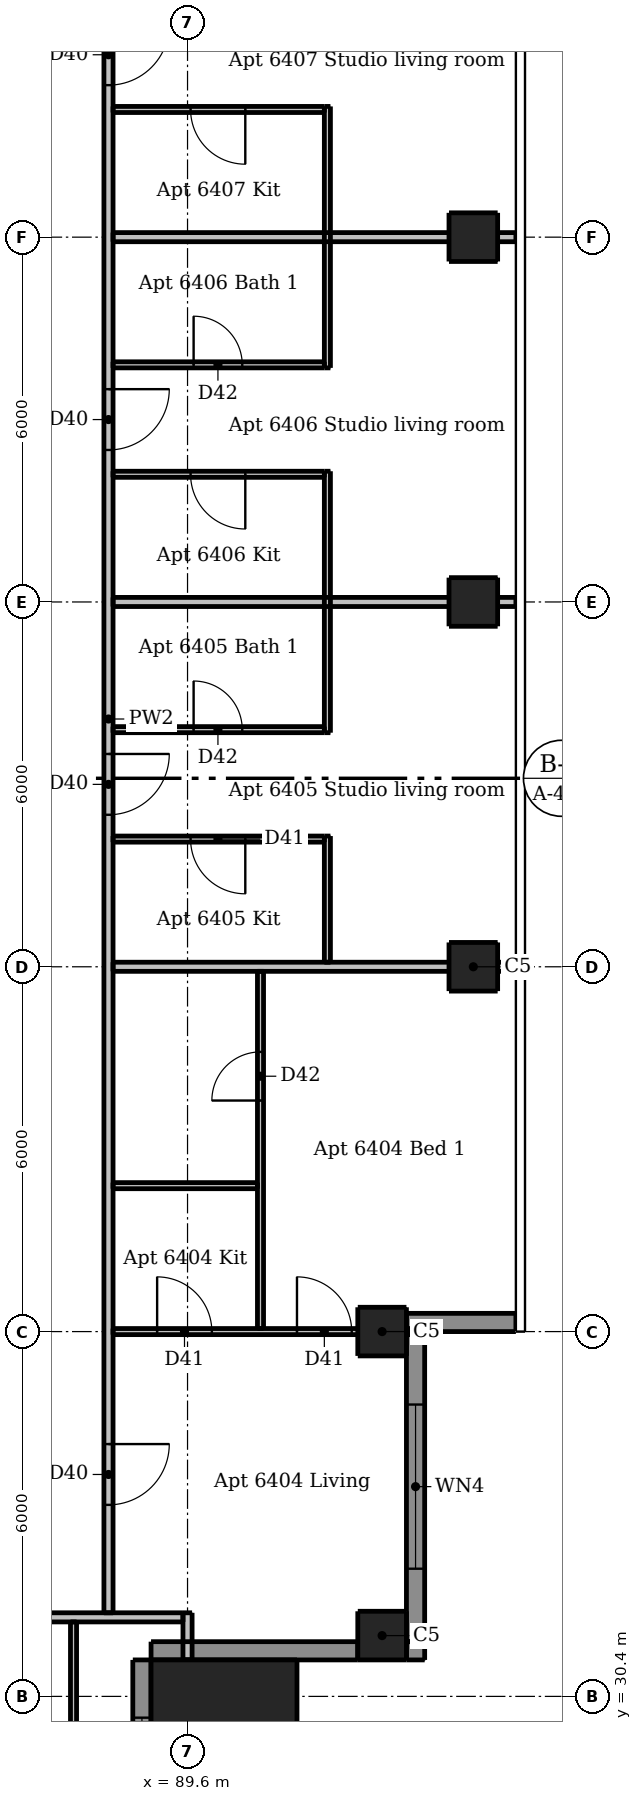
"""IFC4 building model, lengths in metres.
Left out: names, types, materials, properties, quantities, classifications, styles, units other than length and angle.
Written with IfcOpenShell. Run it as: python <this file> out.ifc"""

import sys

from ifc_helpers import new_model, si_unit, direction, frame, frame_2d, origin, origin_2d, place, context, subcontext, project, spatial, rectangle, extrude, element, fill, save


model = new_model("IFC4")
c1 = context("Model", 3, precision=1e-05, world=origin(), true_north=direction((0.0, 1.0)))
c2 = subcontext(c1, "Body", "Model", "MODEL_VIEW")
j1 = project(units=[si_unit("LENGTHUNIT", "METRE"), si_unit("PLANEANGLEUNIT", "RADIAN")], contexts=[c1])
p1 = place(None, origin())
s1 = spatial("IfcSite", under=j1, at=p1, CompositionType="ELEMENT")
p2 = place(p1, origin())
s2 = spatial("IfcBuilding", under=s1, at=p2, CompositionType="ELEMENT")
p3 = place(p2, frame((0.0, 0.0, 242.2)))
s3 = spatial("IfcBuildingStorey", under=s2, at=p3, CompositionType="ELEMENT", Elevation=242.2)
for number, where, z_axis, x_axis in (
    (1, (92.8, 31.4, 0.0), (0.0, 0.0, 1.0), (1.0, 0.0, 0.0)),
    (2, (92.8, 36.4, 0.0), (0.0, 0.0, 1.0), (1.0, 0.0, 0.0)),
    (3, (94.3, 42.4, 0.0), (0.0, 0.0, 1.0), (1.0, 0.0, 0.0)),
    (4, (94.3, 48.4, 0.0), (0.0, 0.0, 1.0), (1.0, 0.0, 0.0)),
    (5, (94.3, 54.4, 0.0), (0.0, 0.0, 1.0), (1.0, 0.0, 0.0)),
):
    element("IfcColumn", number, at=place(p3, frame(where, z_axis=z_axis, x_axis=x_axis)), inside=s3, PredefinedType="COLUMN", context=c2, shape_type="SweptSolid", body=[
        extrude(rectangle(XDim=0.8, YDim=0.8, at=origin_2d()), origin(), (0.0, 0.0, 1.0), 3.05),
    ])
p4 = place(p3, frame((90.2, 29.8, 0.0), z_axis=(0.0, 0.0, 1.0), x_axis=(1.0, 0.0, 0.0)))
e6 = element("IfcColumn", 6, at=p4, inside=s3, PredefinedType="COLUMN", context=c2, shape_type="SweptSolid", body=[
    extrude(rectangle(XDim=2.4, YDim=2.4, at=origin_2d()), origin(), (0.0, 0.0, 1.0), 3.3),
])
p5 = place(p3, frame((88.85, 27.6, 0.0), z_axis=(0.0, 0.0, 1.0), x_axis=(0.0, 1.0, 0.0)))
e7 = element("IfcWall", 7, at=p5, inside=s3, PredefinedType="SOLIDWALL", context=c2, shape_type="SweptSolid", body=[
    extrude(rectangle(XDim=3.4, YDim=0.3, at=frame_2d((1.7, 0.0))), origin(), (0.0, 0.0, 1.0), 3.05),
])
p6 = place(p5, frame((0.95, 0.0, 0.9)))
e8 = element("IfcOpeningElement", 8, at=p6, cuts=e7, PredefinedType="OPENING", context=c2, shape_type="SweptSolid", body=[
    extrude(rectangle(XDim=1.5, YDim=1.5, at=frame_2d((0.75, 0.75))), frame((0.0, 0.16, 0.0), z_axis=(0.0, -1.0, 0.0), x_axis=(1.0, 0.0, 0.0)), (0.0, 0.0, 1.0), 0.32),
])
p7 = place(p3, frame((89.0, 31.15, 0.0), z_axis=(0.0, 0.0, 1.0), x_axis=(1.0, 0.0, 0.0)))
e9 = element("IfcWall", 9, at=p7, inside=s3, PredefinedType="SOLIDWALL", context=c2, shape_type="SweptSolid", body=[
    extrude(rectangle(XDim=3.4, YDim=0.3, at=frame_2d((1.7, 0.0))), origin(), (0.0, 0.0, 1.0), 3.05),
])
p8 = place(p3, frame((93.2, 31.15, 0.0), z_axis=(0.0, 0.0, 1.0), x_axis=(1.0, 0.0, 0.0)))
e10 = element("IfcWall", 10, at=p8, inside=s3, PredefinedType="SOLIDWALL", context=c2, shape_type="SweptSolid", body=[
    extrude(rectangle(XDim=0.3, YDim=0.3, at=frame_2d((0.15, 0.0))), origin(), (0.0, 0.0, 1.0), 3.05),
])
p9 = place(p3, frame((93.2, 36.55, 0.0), z_axis=(0.0, 0.0, 1.0), x_axis=(1.0, 0.0, 0.0)))
e11 = element("IfcWall", 11, at=p9, inside=s3, PredefinedType="SOLIDWALL", context=c2, shape_type="SweptSolid", body=[
    extrude(rectangle(XDim=1.8, YDim=0.3, at=frame_2d((0.9, 0.0))), origin(), (0.0, 0.0, 1.0), 3.05),
])
p10 = place(p3, frame((93.35, 31.3, 0.0), z_axis=(0.0, 0.0, 1.0), x_axis=(0.0, 1.0, 0.0)))
e12 = element("IfcWall", 12, at=p10, inside=s3, PredefinedType="SOLIDWALL", context=c2, shape_type="SweptSolid", body=[
    extrude(rectangle(XDim=5.1, YDim=0.3, at=frame_2d((2.55, 0.0))), origin(), (0.0, 0.0, 1.0), 3.05),
])
p11 = place(p10, frame((1.2, 0.0, 0.15)))
e13 = element("IfcOpeningElement", 13, at=p11, cuts=e12, PredefinedType="OPENING", context=c2, shape_type="SweptSolid", body=[
    extrude(rectangle(XDim=2.7, YDim=2.1, at=frame_2d((1.35, 1.05))), frame((0.0, 0.16, 0.0), z_axis=(0.0, -1.0, 0.0), x_axis=(1.0, 0.0, 0.0)), (0.0, 0.0, 1.0), 0.32),
])
p12 = place(p3, frame((87.725, 29.05, 0.0), z_axis=(0.0, 0.0, 1.0), x_axis=(0.0, 1.0, 0.0)))
e14 = element("IfcWall", 14, at=p12, inside=s3, PredefinedType="PARTITIONING", context=c2, shape_type="SweptSolid", body=[
    extrude(rectangle(XDim=2.575, YDim=0.1, at=frame_2d((1.288, 0.0))), origin(), (0.0, 0.0, 1.0), 3.05),
])
p13 = place(p3, frame((90.8, 36.45, 0.0), z_axis=(0.0, 0.0, 1.0), x_axis=(0.0, 1.0, 0.0)))
e15 = element("IfcWall", 15, at=p13, inside=s3, PredefinedType="PARTITIONING", context=c2, shape_type="SweptSolid", body=[
    extrude(rectangle(XDim=5.875, YDim=0.1, at=frame_2d((2.938, 0.0))), origin(), (0.0, 0.0, 1.0), 3.05),
])
p14 = place(p13, frame((3.75, 0.0, 0.0)))
e16 = element("IfcOpeningElement", 16, at=p14, cuts=e15, PredefinedType="OPENING", context=c2, shape_type="SweptSolid", body=[
    extrude(rectangle(XDim=0.8, YDim=2.1, at=frame_2d((0.4, 1.05))), frame((0.0, 0.06, 0.0), z_axis=(0.0, -1.0, 0.0), x_axis=(1.0, 0.0, 0.0)), (0.0, 0.0, 1.0), 0.12),
])
p15 = place(p3, frame((91.9, 42.475, 0.0), z_axis=(0.0, 0.0, 1.0), x_axis=(0.0, 1.0, 0.0)))
e17 = element("IfcWall", 17, at=p15, inside=s3, PredefinedType="PARTITIONING", context=c2, shape_type="SweptSolid", body=[
    extrude(rectangle(XDim=2.075, YDim=0.1, at=frame_2d((1.038, 0.0))), origin(), (0.0, 0.0, 1.0), 3.05),
])
for number, where, z_axis, x_axis in (
    (18, (91.9, 46.25, 0.0), (0.0, 0.0, 1.0), (0.0, 1.0, 0.0)),
    (19, (91.9, 52.25, 0.0), (0.0, 0.0, 1.0), (0.0, 1.0, 0.0)),
):
    element("IfcWall", number, at=place(p3, frame(where, z_axis=z_axis, x_axis=x_axis)), inside=s3, PredefinedType="PARTITIONING", context=c2, shape_type="SweptSolid", body=[
        extrude(rectangle(XDim=4.3, YDim=0.1, at=frame_2d((2.15, 0.0))), origin(), (0.0, 0.0, 1.0), 3.05),
    ])
p16 = place(p3, frame((91.85, 56.5, 0.0), z_axis=(0.0, 0.0, 1.0), x_axis=(-1.0, 0.0, 0.0)))
e20 = element("IfcWall", 20, at=p16, inside=s3, PredefinedType="PARTITIONING", context=c2, shape_type="SweptSolid", body=[
    extrude(rectangle(XDim=3.475, YDim=0.1, at=frame_2d((1.738, 0.0))), origin(), (0.0, 0.0, 1.0), 3.05),
])
p17 = place(p16, frame((1.3, 0.0, 0.0)))
e21 = element("IfcOpeningElement", 21, at=p17, cuts=e20, PredefinedType="OPENING", context=c2, shape_type="SweptSolid", body=[
    extrude(rectangle(XDim=0.9, YDim=2.1, at=frame_2d((0.45, 1.05))), frame((0.0, 0.06, 0.0), z_axis=(0.0, -1.0, 0.0), x_axis=(1.0, 0.0, 0.0)), (0.0, 0.0, 1.0), 0.12),
])
p18 = place(p3, frame((88.375, 52.3, 0.0), z_axis=(0.0, 0.0, 1.0), x_axis=(1.0, 0.0, 0.0)))
e22 = element("IfcWall", 22, at=p18, inside=s3, PredefinedType="PARTITIONING", context=c2, shape_type="SweptSolid", body=[
    extrude(rectangle(XDim=3.475, YDim=0.1, at=frame_2d((1.738, 0.0))), origin(), (0.0, 0.0, 1.0), 3.05),
])
p19 = place(p18, frame((1.325, 0.0, 0.0)))
e23 = element("IfcOpeningElement", 23, at=p19, cuts=e22, PredefinedType="OPENING", context=c2, shape_type="SweptSolid", body=[
    extrude(rectangle(XDim=0.8, YDim=2.1, at=frame_2d((0.4, 1.05))), frame((0.0, 0.06, 0.0), z_axis=(0.0, -1.0, 0.0), x_axis=(1.0, 0.0, 0.0)), (0.0, 0.0, 1.0), 0.12),
])
p20 = place(p3, frame((91.85, 50.5, 0.0), z_axis=(0.0, 0.0, 1.0), x_axis=(-1.0, 0.0, 0.0)))
e24 = element("IfcWall", 24, at=p20, inside=s3, PredefinedType="PARTITIONING", context=c2, shape_type="SweptSolid", body=[
    extrude(rectangle(XDim=3.475, YDim=0.1, at=frame_2d((1.738, 0.0))), origin(), (0.0, 0.0, 1.0), 3.05),
])
p21 = place(p20, frame((1.3, 0.0, 0.0)))
e25 = element("IfcOpeningElement", 25, at=p21, cuts=e24, PredefinedType="OPENING", context=c2, shape_type="SweptSolid", body=[
    extrude(rectangle(XDim=0.9, YDim=2.1, at=frame_2d((0.45, 1.05))), frame((0.0, 0.06, 0.0), z_axis=(0.0, -1.0, 0.0), x_axis=(1.0, 0.0, 0.0)), (0.0, 0.0, 1.0), 0.12),
])
p22 = place(p3, frame((88.375, 46.3, 0.0), z_axis=(0.0, 0.0, 1.0), x_axis=(1.0, 0.0, 0.0)))
e26 = element("IfcWall", 26, at=p22, inside=s3, PredefinedType="PARTITIONING", context=c2, shape_type="SweptSolid", body=[
    extrude(rectangle(XDim=3.475, YDim=0.1, at=frame_2d((1.738, 0.0))), origin(), (0.0, 0.0, 1.0), 3.05),
])
p23 = place(p22, frame((1.325, 0.0, 0.0)))
e27 = element("IfcOpeningElement", 27, at=p23, cuts=e26, PredefinedType="OPENING", context=c2, shape_type="SweptSolid", body=[
    extrude(rectangle(XDim=0.8, YDim=2.1, at=frame_2d((0.4, 1.05))), frame((0.0, 0.06, 0.0), z_axis=(0.0, -1.0, 0.0), x_axis=(1.0, 0.0, 0.0)), (0.0, 0.0, 1.0), 0.12),
])
p24 = place(p3, frame((91.85, 44.5, 0.0), z_axis=(0.0, 0.0, 1.0), x_axis=(-1.0, 0.0, 0.0)))
e28 = element("IfcWall", 28, at=p24, inside=s3, PredefinedType="PARTITIONING", context=c2, shape_type="SweptSolid", body=[
    extrude(rectangle(XDim=3.475, YDim=0.1, at=frame_2d((1.738, 0.0))), origin(), (0.0, 0.0, 1.0), 3.05),
])
p25 = place(p24, frame((1.3, 0.0, 0.0)))
e29 = element("IfcOpeningElement", 29, at=p25, cuts=e28, PredefinedType="OPENING", context=c2, shape_type="SweptSolid", body=[
    extrude(rectangle(XDim=0.9, YDim=2.1, at=frame_2d((0.45, 1.05))), frame((0.0, 0.06, 0.0), z_axis=(0.0, -1.0, 0.0), x_axis=(1.0, 0.0, 0.0)), (0.0, 0.0, 1.0), 0.12),
])
p26 = place(p3, frame((88.375, 38.8, 0.0), z_axis=(0.0, 0.0, 1.0), x_axis=(1.0, 0.0, 0.0)))
e30 = element("IfcWall", 30, at=p26, inside=s3, PredefinedType="PARTITIONING", context=c2, shape_type="SweptSolid", body=[
    extrude(rectangle(XDim=2.375, YDim=0.1, at=frame_2d((1.188, 0.0))), origin(), (0.0, 0.0, 1.0), 3.05),
])
p27 = place(p3, frame((88.375, 36.4, 0.0), z_axis=(0.0, 0.0, 1.0), x_axis=(1.0, 0.0, 0.0)))
e31 = element("IfcWall", 31, at=p27, inside=s3, PredefinedType="PARTITIONING", context=c2, shape_type="SweptSolid", body=[
    extrude(rectangle(XDim=5.125, YDim=0.1, at=frame_2d((2.562, 0.0))), origin(), (0.0, 0.0, 1.0), 2.647),
])
p28 = place(p27, frame((0.725, 0.0, 0.0)))
e32 = element("IfcOpeningElement", 32, at=p28, cuts=e31, PredefinedType="OPENING", context=c2, shape_type="SweptSolid", body=[
    extrude(rectangle(XDim=0.9, YDim=2.1, at=frame_2d((0.45, 1.05))), frame((0.0, 0.06, 0.0), z_axis=(0.0, -1.0, 0.0), x_axis=(1.0, 0.0, 0.0)), (0.0, 0.0, 1.0), 0.12),
])
p29 = place(p27, frame((3.025, 0.0, 0.0)))
e33 = element("IfcOpeningElement", 33, at=p29, cuts=e31, PredefinedType="OPENING", context=c2, shape_type="SweptSolid", body=[
    extrude(rectangle(XDim=0.9, YDim=2.1, at=frame_2d((0.45, 1.05))), frame((0.0, 0.06, 0.0), z_axis=(0.0, -1.0, 0.0), x_axis=(1.0, 0.0, 0.0)), (0.0, 0.0, 1.0), 0.12),
])
p30 = place(p3, frame((88.3, 61.175, 0.0), z_axis=(0.0, 0.0, 1.0), x_axis=(0.0, -1.0, 0.0)))
e34 = element("IfcWall", 34, at=p30, inside=s3, PredefinedType="PARTITIONING", context=c2, shape_type="SweptSolid", body=[
    extrude(rectangle(XDim=29.4, YDim=0.15, at=frame_2d((14.7, 0.0))), origin(), (0.0, 0.0, 1.0), 3.05),
])
p31 = place(p30, frame((26.625, 0.0, 0.0)))
e35 = element("IfcOpeningElement", 35, at=p31, cuts=e34, PredefinedType="OPENING", context=c2, shape_type="SweptSolid", body=[
    extrude(rectangle(XDim=1.0, YDim=2.1, at=frame_2d((0.5, 1.05))), frame((0.0, 0.085, 0.0), z_axis=(0.0, -1.0, 0.0), x_axis=(1.0, 0.0, 0.0)), (0.0, 0.0, 1.0), 0.17),
])
p32 = place(p30, frame((15.275, 0.0, 0.0)))
e36 = element("IfcOpeningElement", 36, at=p32, cuts=e34, PredefinedType="OPENING", context=c2, shape_type="SweptSolid", body=[
    extrude(rectangle(XDim=1.0, YDim=2.1, at=frame_2d((0.5, 1.05))), frame((0.0, 0.085, 0.0), z_axis=(0.0, -1.0, 0.0), x_axis=(1.0, 0.0, 0.0)), (0.0, 0.0, 1.0), 0.17),
])
p33 = place(p30, frame((9.275, 0.0, 0.0)))
e37 = element("IfcOpeningElement", 37, at=p33, cuts=e34, PredefinedType="OPENING", context=c2, shape_type="SweptSolid", body=[
    extrude(rectangle(XDim=1.0, YDim=2.1, at=frame_2d((0.5, 1.05))), frame((0.0, 0.085, 0.0), z_axis=(0.0, -1.0, 0.0), x_axis=(1.0, 0.0, 0.0)), (0.0, 0.0, 1.0), 0.17),
])
p34 = place(p30, frame((3.275, 0.0, 0.0)))
e38 = element("IfcOpeningElement", 38, at=p34, cuts=e34, PredefinedType="OPENING", context=c2, shape_type="SweptSolid", body=[
    extrude(rectangle(XDim=1.0, YDim=2.1, at=frame_2d((0.5, 1.05))), frame((0.0, 0.085, 0.0), z_axis=(0.0, -1.0, 0.0), x_axis=(1.0, 0.0, 0.0)), (0.0, 0.0, 1.0), 0.17),
])
p35 = place(p3, frame((89.6, 31.0, 0.0), z_axis=(0.0, 0.0, 1.0), x_axis=(0.0, 1.0, 0.0)))
e39 = element("IfcWall", 39, at=p35, inside=s3, PredefinedType="PARTITIONING", context=c2, shape_type="SweptSolid", body=[
    extrude(rectangle(XDim=0.775, YDim=0.15, at=frame_2d((0.387, 0.0))), origin(), (0.0, 0.0, 1.0), 3.05),
])
for number, where, z_axis, x_axis in (
    (40, (88.375, 54.4, 0.0), (0.0, 0.0, 1.0), (1.0, 0.0, 0.0)),
    (41, (88.375, 48.4, 0.0), (0.0, 0.0, 1.0), (1.0, 0.0, 0.0)),
    (42, (88.375, 42.4, 0.0), (0.0, 0.0, 1.0), (1.0, 0.0, 0.0)),
):
    element("IfcWall", number, at=place(p3, frame(where, z_axis=z_axis, x_axis=x_axis)), inside=s3, PredefinedType="PARTITIONING", context=c2, shape_type="SweptSolid", body=[
        extrude(rectangle(XDim=6.625, YDim=0.15, at=frame_2d((3.312, 0.0))), origin(), (0.0, 0.0, 1.0), 2.59),
    ])
p36 = place(p3, frame((89.525, 31.7, 0.0), z_axis=(0.0, 0.0, 1.0), x_axis=(-1.0, 0.0, 0.0)))
e43 = element("IfcWall", 43, at=p36, inside=s3, PredefinedType="PARTITIONING", context=c2, shape_type="SweptSolid", body=[
    extrude(rectangle(XDim=30.55, YDim=0.15, at=frame_2d((15.275, 0.0))), origin(), (0.0, 0.0, 1.0), 3.05),
])
p37 = place(p36, frame((26.775, 0.0, 0.0)))
e44 = element("IfcOpeningElement", 44, at=p37, cuts=e43, PredefinedType="OPENING", context=c2, shape_type="SweptSolid", body=[
    extrude(rectangle(XDim=1.0, YDim=2.1, at=frame_2d((0.5, 1.05))), frame((0.0, 0.085, 0.0), z_axis=(0.0, -1.0, 0.0), x_axis=(1.0, 0.0, 0.0)), (0.0, 0.0, 1.0), 0.17),
])
p38 = place(p36, frame((14.425, 0.0, 0.0)))
e45 = element("IfcOpeningElement", 45, at=p38, cuts=e43, PredefinedType="OPENING", context=c2, shape_type="SweptSolid", body=[
    extrude(rectangle(XDim=1.0, YDim=2.1, at=frame_2d((0.5, 1.05))), frame((0.0, 0.085, 0.0), z_axis=(0.0, -1.0, 0.0), x_axis=(1.0, 0.0, 0.0)), (0.0, 0.0, 1.0), 0.17),
])
p39 = place(p36, frame((6.962, 0.0, 0.0)))
e46 = element("IfcOpeningElement", 46, at=p39, cuts=e43, PredefinedType="OPENING", context=c2, shape_type="SweptSolid", body=[
    extrude(rectangle(XDim=1.0, YDim=2.1, at=frame_2d((0.5, 1.05))), frame((0.0, 0.085, 0.0), z_axis=(0.0, -1.0, 0.0), x_axis=(1.0, 0.0, 0.0)), (0.0, 0.0, 1.0), 0.17),
])
p40 = place(p6, origin())
e47 = element("IfcWindow", 47, at=p40, inside=s3, PartitioningType="DOUBLE_PANEL_VERTICAL", PredefinedType="WINDOW", context=c2, shape_type="SweptSolid", body=[
    extrude(rectangle(XDim=1.5, YDim=1.5, at=frame_2d((0.75, 0.75))), frame((0.0, 0.03, 0.0), z_axis=(0.0, -1.0, 0.0), x_axis=(1.0, 0.0, 0.0)), (0.0, 0.0, 1.0), 0.06),
])
fill(e8, e47)
p41 = place(p11, origin())
e48 = element("IfcWindow", 48, at=p41, inside=s3, PartitioningType="DOUBLE_PANEL_VERTICAL", PredefinedType="WINDOW", context=c2, shape_type="SweptSolid", body=[
    extrude(rectangle(XDim=2.7, YDim=2.1, at=frame_2d((1.35, 1.05))), frame((0.0, 0.03, 0.0), z_axis=(0.0, -1.0, 0.0), x_axis=(1.0, 0.0, 0.0)), (0.0, 0.0, 1.0), 0.06),
])
fill(e13, e48)
p42 = place(p31, origin())
e49 = element("IfcDoor", 49, at=p42, inside=s3, OperationType="SINGLE_SWING_LEFT", PredefinedType="DOOR", context=c2, shape_type="SweptSolid", body=[
    extrude(rectangle(XDim=1.0, YDim=2.1, at=frame_2d((0.5, 1.05))), frame((0.0, 0.025, 0.0), z_axis=(0.0, -1.0, 0.0), x_axis=(1.0, 0.0, 0.0)), (0.0, 0.0, 1.0), 0.05),
])
fill(e35, e49)
p43 = place(p28, origin())
e50 = element("IfcDoor", 50, at=p43, inside=s3, OperationType="SINGLE_SWING_LEFT", PredefinedType="DOOR", context=c2, shape_type="SweptSolid", body=[
    extrude(rectangle(XDim=0.9, YDim=2.1, at=frame_2d((0.45, 1.05))), frame((0.0, 0.025, 0.0), z_axis=(0.0, -1.0, 0.0), x_axis=(1.0, 0.0, 0.0)), (0.0, 0.0, 1.0), 0.05),
])
fill(e32, e50)
p44 = place(p29, origin())
e51 = element("IfcDoor", 51, at=p44, inside=s3, OperationType="SINGLE_SWING_LEFT", PredefinedType="DOOR", context=c2, shape_type="SweptSolid", body=[
    extrude(rectangle(XDim=0.9, YDim=2.1, at=frame_2d((0.45, 1.05))), frame((0.0, 0.025, 0.0), z_axis=(0.0, -1.0, 0.0), x_axis=(1.0, 0.0, 0.0)), (0.0, 0.0, 1.0), 0.05),
])
fill(e33, e51)
p45 = place(p14, origin())
e52 = element("IfcDoor", 52, at=p45, inside=s3, OperationType="SINGLE_SWING_LEFT", PredefinedType="DOOR", context=c2, shape_type="SweptSolid", body=[
    extrude(rectangle(XDim=0.8, YDim=2.1, at=frame_2d((0.4, 1.05))), frame((0.0, 0.025, 0.0), z_axis=(0.0, -1.0, 0.0), x_axis=(1.0, 0.0, 0.0)), (0.0, 0.0, 1.0), 0.05),
])
fill(e16, e52)
p46 = place(p32, origin())
e53 = element("IfcDoor", 53, at=p46, inside=s3, OperationType="SINGLE_SWING_LEFT", PredefinedType="DOOR", context=c2, shape_type="SweptSolid", body=[
    extrude(rectangle(XDim=1.0, YDim=2.1, at=frame_2d((0.5, 1.05))), frame((0.0, 0.025, 0.0), z_axis=(0.0, -1.0, 0.0), x_axis=(1.0, 0.0, 0.0)), (0.0, 0.0, 1.0), 0.05),
])
fill(e36, e53)
p47 = place(p25, origin())
e54 = element("IfcDoor", 54, at=p47, inside=s3, OperationType="SINGLE_SWING_LEFT", PredefinedType="DOOR", context=c2, shape_type="SweptSolid", body=[
    extrude(rectangle(XDim=0.9, YDim=2.1, at=frame_2d((0.45, 1.05))), frame((0.0, 0.025, 0.0), z_axis=(0.0, -1.0, 0.0), x_axis=(1.0, 0.0, 0.0)), (0.0, 0.0, 1.0), 0.05),
])
fill(e29, e54)
p48 = place(p23, origin())
e55 = element("IfcDoor", 55, at=p48, inside=s3, OperationType="SINGLE_SWING_LEFT", PredefinedType="DOOR", context=c2, shape_type="SweptSolid", body=[
    extrude(rectangle(XDim=0.8, YDim=2.1, at=frame_2d((0.4, 1.05))), frame((0.0, 0.025, 0.0), z_axis=(0.0, -1.0, 0.0), x_axis=(1.0, 0.0, 0.0)), (0.0, 0.0, 1.0), 0.05),
])
fill(e27, e55)
p49 = place(p33, origin())
e56 = element("IfcDoor", 56, at=p49, inside=s3, OperationType="SINGLE_SWING_LEFT", PredefinedType="DOOR", context=c2, shape_type="SweptSolid", body=[
    extrude(rectangle(XDim=1.0, YDim=2.1, at=frame_2d((0.5, 1.05))), frame((0.0, 0.025, 0.0), z_axis=(0.0, -1.0, 0.0), x_axis=(1.0, 0.0, 0.0)), (0.0, 0.0, 1.0), 0.05),
])
fill(e37, e56)
p50 = place(p21, origin())
e57 = element("IfcDoor", 57, at=p50, inside=s3, OperationType="SINGLE_SWING_LEFT", PredefinedType="DOOR", context=c2, shape_type="SweptSolid", body=[
    extrude(rectangle(XDim=0.9, YDim=2.1, at=frame_2d((0.45, 1.05))), frame((0.0, 0.025, 0.0), z_axis=(0.0, -1.0, 0.0), x_axis=(1.0, 0.0, 0.0)), (0.0, 0.0, 1.0), 0.05),
])
fill(e25, e57)
p51 = place(p19, origin())
e58 = element("IfcDoor", 58, at=p51, inside=s3, OperationType="SINGLE_SWING_LEFT", PredefinedType="DOOR", context=c2, shape_type="SweptSolid", body=[
    extrude(rectangle(XDim=0.8, YDim=2.1, at=frame_2d((0.4, 1.05))), frame((0.0, 0.025, 0.0), z_axis=(0.0, -1.0, 0.0), x_axis=(1.0, 0.0, 0.0)), (0.0, 0.0, 1.0), 0.05),
])
fill(e23, e58)
p52 = place(p34, origin())
e59 = element("IfcDoor", 59, at=p52, inside=s3, OperationType="SINGLE_SWING_LEFT", PredefinedType="DOOR", context=c2, shape_type="SweptSolid", body=[
    extrude(rectangle(XDim=1.0, YDim=2.1, at=frame_2d((0.5, 1.05))), frame((0.0, 0.025, 0.0), z_axis=(0.0, -1.0, 0.0), x_axis=(1.0, 0.0, 0.0)), (0.0, 0.0, 1.0), 0.05),
])
fill(e38, e59)
p53 = place(p17, origin())
e60 = element("IfcDoor", 60, at=p53, inside=s3, OperationType="SINGLE_SWING_LEFT", PredefinedType="DOOR", context=c2, shape_type="SweptSolid", body=[
    extrude(rectangle(XDim=0.9, YDim=2.1, at=frame_2d((0.45, 1.05))), frame((0.0, 0.025, 0.0), z_axis=(0.0, -1.0, 0.0), x_axis=(1.0, 0.0, 0.0)), (0.0, 0.0, 1.0), 0.05),
])
fill(e21, e60)
save(model, sys.argv[1])
